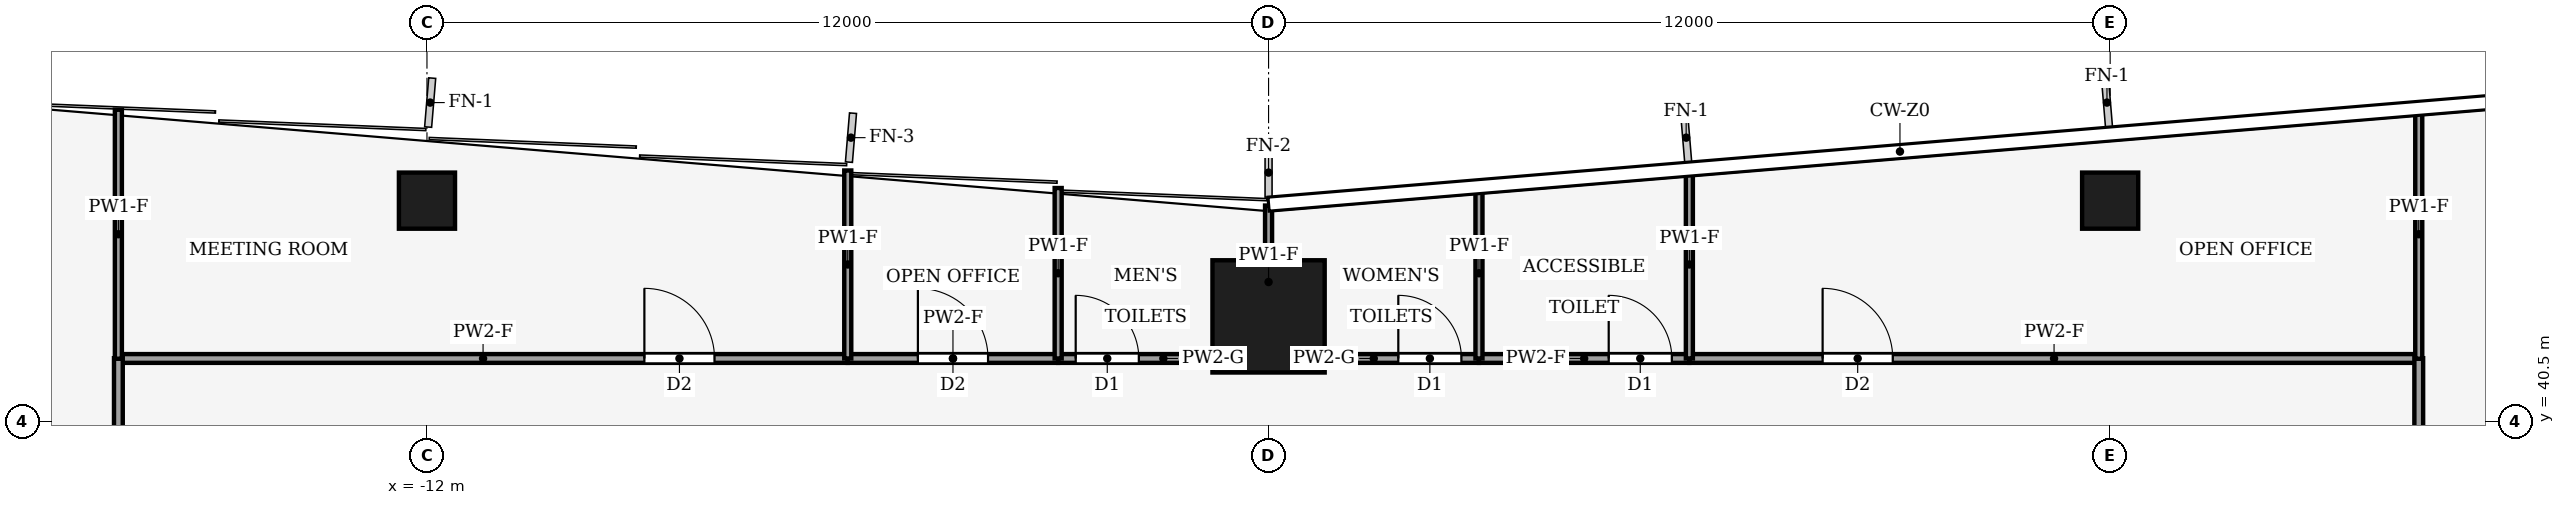
"""IFC4 building model, lengths in metres.
Left out: names, types, materials, properties, quantities, classifications, styles, units other than length and angle.
Written with IfcOpenShell. Run it as: python <this file> out.ifc"""

import sys

from ifc_helpers import new_model, si_unit, direction, frame, frame_2d, origin, origin_2d, place, context, subcontext, project, spatial, rectangle, hollow_rectangle, extrude, element, fill, save


model = new_model("IFC4")
c1 = context("Model", 3, precision=1e-05, world=origin(), true_north=direction((0.0, 1.0)))
c2 = subcontext(c1, "Body", "Model", "MODEL_VIEW")
j1 = project(units=[si_unit("LENGTHUNIT", "METRE"), si_unit("PLANEANGLEUNIT", "RADIAN")], contexts=[c1])
p1 = place(None, origin())
s1 = spatial("IfcSite", under=j1, at=p1, CompositionType="ELEMENT")
p2 = place(p1, origin())
s2 = spatial("IfcBuilding", under=s1, at=p2, CompositionType="ELEMENT")
p3 = place(p2, frame((0.0, 0.0, 38.0)))
s3 = spatial("IfcBuildingStorey", under=s2, at=p3, CompositionType="ELEMENT", Elevation=38.0)
p4 = place(p3, frame((0.0, 42.0, 0.0), z_axis=(0.0, 0.0, 1.0), x_axis=(1.0, 0.0, 0.0)))
e1 = element("IfcColumn", 1, at=p4, inside=s3, PredefinedType="COLUMN", context=c2, shape_type="SweptSolid", body=[
    extrude(hollow_rectangle(XDim=1.6, YDim=1.6, WallThickness=0.09, at=origin_2d()), origin(), (0.0, 0.0, 1.0), 4.0),
])
for number, where, z_axis, x_axis in (
    (2, (-12.0, 43.65, 0.0), (0.0, 0.0, 1.0), (1.0, 0.0, 0.0)),
    (3, (12.0, 43.65, 0.0), (0.0, 0.0, 1.0), (1.0, 0.0, 0.0)),
):
    element("IfcColumn", number, at=place(p3, frame(where, z_axis=z_axis, x_axis=x_axis)), inside=s3, PredefinedType="COLUMN", context=c2, shape_type="SweptSolid", body=[
        extrude(hollow_rectangle(XDim=0.8, YDim=0.8, WallThickness=0.04, at=origin_2d()), origin(), (0.0, 0.0, 1.0), 4.0),
    ])
p5 = place(p3, frame((-16.4, 41.4, 0.0), z_axis=(0.0, 0.0, 1.0), x_axis=(1.0, 0.0, 0.0)))
e4 = element("IfcWall", 4, at=p5, inside=s3, PredefinedType="PARTITIONING", context=c2, shape_type="SweptSolid", body=[
    extrude(rectangle(XDim=10.4, YDim=0.125, at=frame_2d((5.2, 0.0))), origin(), (0.0, 0.0, 1.0), 3.54),
])
p6 = place(p5, frame((7.5, 0.0, 0.0)))
e5 = element("IfcOpeningElement", 5, at=p6, cuts=e4, PredefinedType="OPENING", context=c2, shape_type="SweptSolid", body=[
    extrude(rectangle(XDim=1.0, YDim=2.1, at=frame_2d((0.5, 1.05))), frame((0.0, 0.073, 0.0), z_axis=(0.0, -1.0, 0.0), x_axis=(1.0, 0.0, 0.0)), (0.0, 0.0, 1.0), 0.145),
])
p7 = place(p3, frame((-6.0, 41.4, 0.0), z_axis=(0.0, 0.0, 1.0), x_axis=(1.0, 0.0, 0.0)))
e6 = element("IfcWall", 6, at=p7, inside=s3, PredefinedType="PARTITIONING", context=c2, shape_type="SweptSolid", body=[
    extrude(rectangle(XDim=3.0, YDim=0.125, at=frame_2d((1.5, 0.0))), origin(), (0.0, 0.0, 1.0), 3.54),
])
p8 = place(p7, frame((1.0, 0.0, 0.0)))
e7 = element("IfcOpeningElement", 7, at=p8, cuts=e6, PredefinedType="OPENING", context=c2, shape_type="SweptSolid", body=[
    extrude(rectangle(XDim=1.0, YDim=2.1, at=frame_2d((0.5, 1.05))), frame((0.0, 0.073, 0.0), z_axis=(0.0, -1.0, 0.0), x_axis=(1.0, 0.0, 0.0)), (0.0, 0.0, 1.0), 0.145),
])
p9 = place(p3, frame((-3.0, 41.4, 0.0), z_axis=(0.0, 0.0, 1.0), x_axis=(1.0, 0.0, 0.0)))
e8 = element("IfcWall", 8, at=p9, inside=s3, PredefinedType="PARTITIONING", context=c2, shape_type="SweptSolid", body=[
    extrude(rectangle(XDim=3.0, YDim=0.125, at=frame_2d((1.5, 0.0))), origin(), (0.0, 0.0, 1.0), 3.87),
])
p10 = place(p9, frame((0.25, 0.0, 0.0)))
e9 = element("IfcOpeningElement", 9, at=p10, cuts=e8, PredefinedType="OPENING", context=c2, shape_type="SweptSolid", body=[
    extrude(rectangle(XDim=0.9, YDim=2.1, at=frame_2d((0.45, 1.05))), frame((0.0, 0.073, 0.0), z_axis=(0.0, -1.0, 0.0), x_axis=(1.0, 0.0, 0.0)), (0.0, 0.0, 1.0), 0.145),
])
p11 = place(p3, frame((0.0, 41.4, 0.0), z_axis=(0.0, 0.0, 1.0), x_axis=(1.0, 0.0, 0.0)))
e10 = element("IfcWall", 10, at=p11, inside=s3, PredefinedType="PARTITIONING", context=c2, shape_type="SweptSolid", body=[
    extrude(rectangle(XDim=3.0, YDim=0.125, at=frame_2d((1.5, 0.0))), origin(), (0.0, 0.0, 1.0), 3.87),
])
p12 = place(p11, frame((1.85, 0.0, 0.0)))
e11 = element("IfcOpeningElement", 11, at=p12, cuts=e10, PredefinedType="OPENING", context=c2, shape_type="SweptSolid", body=[
    extrude(rectangle(XDim=0.9, YDim=2.1, at=frame_2d((0.45, 1.05))), frame((0.0, 0.073, 0.0), z_axis=(0.0, -1.0, 0.0), x_axis=(1.0, 0.0, 0.0)), (0.0, 0.0, 1.0), 0.145),
])
p13 = place(p3, frame((3.0, 41.4, 0.0), z_axis=(0.0, 0.0, 1.0), x_axis=(1.0, 0.0, 0.0)))
e12 = element("IfcWall", 12, at=p13, inside=s3, PredefinedType="PARTITIONING", context=c2, shape_type="SweptSolid", body=[
    extrude(rectangle(XDim=3.0, YDim=0.125, at=frame_2d((1.5, 0.0))), origin(), (0.0, 0.0, 1.0), 3.54),
])
p14 = place(p13, frame((1.85, 0.0, 0.0)))
e13 = element("IfcOpeningElement", 13, at=p14, cuts=e12, PredefinedType="OPENING", context=c2, shape_type="SweptSolid", body=[
    extrude(rectangle(XDim=0.9, YDim=2.1, at=frame_2d((0.45, 1.05))), frame((0.0, 0.073, 0.0), z_axis=(0.0, -1.0, 0.0), x_axis=(1.0, 0.0, 0.0)), (0.0, 0.0, 1.0), 0.145),
])
p15 = place(p3, frame((6.0, 41.4, 0.0), z_axis=(0.0, 0.0, 1.0), x_axis=(1.0, 0.0, 0.0)))
e14 = element("IfcWall", 14, at=p15, inside=s3, PredefinedType="PARTITIONING", context=c2, shape_type="SweptSolid", body=[
    extrude(rectangle(XDim=10.4, YDim=0.125, at=frame_2d((5.2, 0.0))), origin(), (0.0, 0.0, 1.0), 3.54),
])
p16 = place(p15, frame((1.9, 0.0, 0.0)))
e15 = element("IfcOpeningElement", 15, at=p16, cuts=e14, PredefinedType="OPENING", context=c2, shape_type="SweptSolid", body=[
    extrude(rectangle(XDim=1.0, YDim=2.1, at=frame_2d((0.5, 1.05))), frame((0.0, 0.073, 0.0), z_axis=(0.0, -1.0, 0.0), x_axis=(1.0, 0.0, 0.0)), (0.0, 0.0, 1.0), 0.145),
])
p17 = place(p3, frame((-16.4, 33.0, 0.0), z_axis=(0.0, 0.0, 1.0), x_axis=(0.0, 1.0, 0.0)))
e16 = element("IfcWall", 16, at=p17, inside=s3, PredefinedType="PARTITIONING", context=c2, shape_type="SweptSolid", body=[
    extrude(rectangle(XDim=8.404, YDim=0.125, at=frame_2d((4.202, 0.0))), origin(), (0.0, 0.0, 1.0), 3.14),
])
p18 = place(p17, frame((3.702, 0.0, 0.0)))
e17 = element("IfcOpeningElement", 17, at=p18, cuts=e16, PredefinedType="OPENING", context=c2, shape_type="SweptSolid", body=[
    extrude(rectangle(XDim=1.0, YDim=2.1, at=frame_2d((0.5, 1.05))), frame((0.0, 0.073, 0.0), z_axis=(0.0, -1.0, 0.0), x_axis=(1.0, 0.0, 0.0)), (0.0, 0.0, 1.0), 0.145),
])
p19 = place(p3, frame((16.4, 41.404, 0.0), z_axis=(0.0, 0.0, 1.0), x_axis=(0.0, -1.0, 0.0)))
e18 = element("IfcWall", 18, at=p19, inside=s3, PredefinedType="PARTITIONING", context=c2, shape_type="SweptSolid", body=[
    extrude(rectangle(XDim=8.404, YDim=0.125, at=frame_2d((4.202, 0.0))), origin(), (0.0, 0.0, 1.0), 3.14),
])
p20 = place(p19, frame((3.702, 0.0, 0.0)))
e19 = element("IfcOpeningElement", 19, at=p20, cuts=e18, PredefinedType="OPENING", context=c2, shape_type="SweptSolid", body=[
    extrude(rectangle(XDim=1.0, YDim=2.1, at=frame_2d((0.5, 1.05))), frame((0.0, 0.073, 0.0), z_axis=(0.0, -1.0, 0.0), x_axis=(1.0, 0.0, 0.0)), (0.0, 0.0, 1.0), 0.145),
])
p21 = place(p3, frame((-6.0, 41.4, 0.0), z_axis=(0.0, 0.0, 1.0), x_axis=(0.0, 1.0, 0.0)))
e20 = element("IfcWall", 20, at=p21, inside=s3, PredefinedType="PARTITIONING", context=c2, shape_type="SweptSolid", body=[
    extrude(rectangle(XDim=2.68, YDim=0.1, at=frame_2d((1.34, 0.0))), origin(), (0.0, 0.0, 1.0), 3.04),
])
p22 = place(p3, frame((-16.4, 44.947, 0.0), z_axis=(0.0, 0.0, 1.0), x_axis=(0.0, -1.0, 0.0)))
e21 = element("IfcWall", 21, at=p22, inside=s3, PredefinedType="PARTITIONING", context=c2, shape_type="SweptSolid", body=[
    extrude(rectangle(XDim=3.551, YDim=0.1, at=frame_2d((1.775, 0.0))), origin(), (0.0, 0.0, 1.0), 3.04),
])
p23 = place(p3, frame((-3.0, 41.4, 0.0), z_axis=(0.0, 0.0, 1.0), x_axis=(0.0, 1.0, 0.0)))
e22 = element("IfcWall", 22, at=p23, inside=s3, PredefinedType="PARTITIONING", context=c2, shape_type="SweptSolid", body=[
    extrude(rectangle(XDim=2.43, YDim=0.1, at=frame_2d((1.215, 0.0))), origin(), (0.0, 0.0, 1.0), 3.04),
])
p24 = place(p3, frame((0.0, 41.4, 0.0), z_axis=(0.0, 0.0, 1.0), x_axis=(0.0, 1.0, 0.0)))
e23 = element("IfcWall", 23, at=p24, inside=s3, PredefinedType="PARTITIONING", context=c2, shape_type="SweptSolid", body=[
    extrude(rectangle(XDim=2.18, YDim=0.1, at=frame_2d((1.09, 0.0))), origin(), (0.0, 0.0, 1.0), 3.04),
])
p25 = place(p3, frame((3.0, 41.4, 0.0), z_axis=(0.0, 0.0, 1.0), x_axis=(0.0, 1.0, 0.0)))
e24 = element("IfcWall", 24, at=p25, inside=s3, PredefinedType="PARTITIONING", context=c2, shape_type="SweptSolid", body=[
    extrude(rectangle(XDim=2.43, YDim=0.1, at=frame_2d((1.215, 0.0))), origin(), (0.0, 0.0, 1.0), 3.04),
])
p26 = place(p3, frame((6.0, 41.4, 0.0), z_axis=(0.0, 0.0, 1.0), x_axis=(0.0, 1.0, 0.0)))
e25 = element("IfcWall", 25, at=p26, inside=s3, PredefinedType="PARTITIONING", context=c2, shape_type="SweptSolid", body=[
    extrude(rectangle(XDim=2.68, YDim=0.1, at=frame_2d((1.34, 0.0))), origin(), (0.0, 0.0, 1.0), 3.04),
])
p27 = place(p3, frame((16.4, 41.396, 0.0), z_axis=(0.0, 0.0, 1.0), x_axis=(0.0, 1.0, 0.0)))
e26 = element("IfcWall", 26, at=p27, inside=s3, PredefinedType="PARTITIONING", context=c2, shape_type="SweptSolid", body=[
    extrude(rectangle(XDim=3.551, YDim=0.1, at=frame_2d((1.775, 0.0))), origin(), (0.0, 0.0, 1.0), 3.04),
])
p28 = place(p6, origin())
e27 = element("IfcDoor", 27, at=p28, inside=s3, OperationType="SINGLE_SWING_RIGHT", PredefinedType="DOOR", context=c2, shape_type="SweptSolid", body=[
    extrude(rectangle(XDim=1.0, YDim=2.1, at=frame_2d((0.5, 1.05))), frame((0.0, 0.025, 0.0), z_axis=(0.0, -1.0, 0.0), x_axis=(1.0, 0.0, 0.0)), (0.0, 0.0, 1.0), 0.05),
])
fill(e5, e27)
p29 = place(p8, origin())
e28 = element("IfcDoor", 28, at=p29, inside=s3, OperationType="SINGLE_SWING_RIGHT", PredefinedType="DOOR", context=c2, shape_type="SweptSolid", body=[
    extrude(rectangle(XDim=1.0, YDim=2.1, at=frame_2d((0.5, 1.05))), frame((0.0, 0.025, 0.0), z_axis=(0.0, -1.0, 0.0), x_axis=(1.0, 0.0, 0.0)), (0.0, 0.0, 1.0), 0.05),
])
fill(e7, e28)
p30 = place(p10, origin())
e29 = element("IfcDoor", 29, at=p30, inside=s3, OperationType="SINGLE_SWING_LEFT", PredefinedType="DOOR", context=c2, shape_type="SweptSolid", body=[
    extrude(rectangle(XDim=0.9, YDim=2.1, at=frame_2d((0.45, 1.05))), frame((0.0, 0.025, 0.0), z_axis=(0.0, -1.0, 0.0), x_axis=(1.0, 0.0, 0.0)), (0.0, 0.0, 1.0), 0.05),
])
fill(e9, e29)
p31 = place(p12, origin())
e30 = element("IfcDoor", 30, at=p31, inside=s3, OperationType="SINGLE_SWING_RIGHT", PredefinedType="DOOR", context=c2, shape_type="SweptSolid", body=[
    extrude(rectangle(XDim=0.9, YDim=2.1, at=frame_2d((0.45, 1.05))), frame((0.0, 0.025, 0.0), z_axis=(0.0, -1.0, 0.0), x_axis=(1.0, 0.0, 0.0)), (0.0, 0.0, 1.0), 0.05),
])
fill(e11, e30)
p32 = place(p14, origin())
e31 = element("IfcDoor", 31, at=p32, inside=s3, OperationType="SINGLE_SWING_RIGHT", PredefinedType="DOOR", context=c2, shape_type="SweptSolid", body=[
    extrude(rectangle(XDim=0.9, YDim=2.1, at=frame_2d((0.45, 1.05))), frame((0.0, 0.025, 0.0), z_axis=(0.0, -1.0, 0.0), x_axis=(1.0, 0.0, 0.0)), (0.0, 0.0, 1.0), 0.05),
])
fill(e13, e31)
p33 = place(p16, origin())
e32 = element("IfcDoor", 32, at=p33, inside=s3, OperationType="SINGLE_SWING_LEFT", PredefinedType="DOOR", context=c2, shape_type="SweptSolid", body=[
    extrude(rectangle(XDim=1.0, YDim=2.1, at=frame_2d((0.5, 1.05))), frame((0.0, 0.025, 0.0), z_axis=(0.0, -1.0, 0.0), x_axis=(1.0, 0.0, 0.0)), (0.0, 0.0, 1.0), 0.05),
])
fill(e15, e32)
save(model, sys.argv[1])
